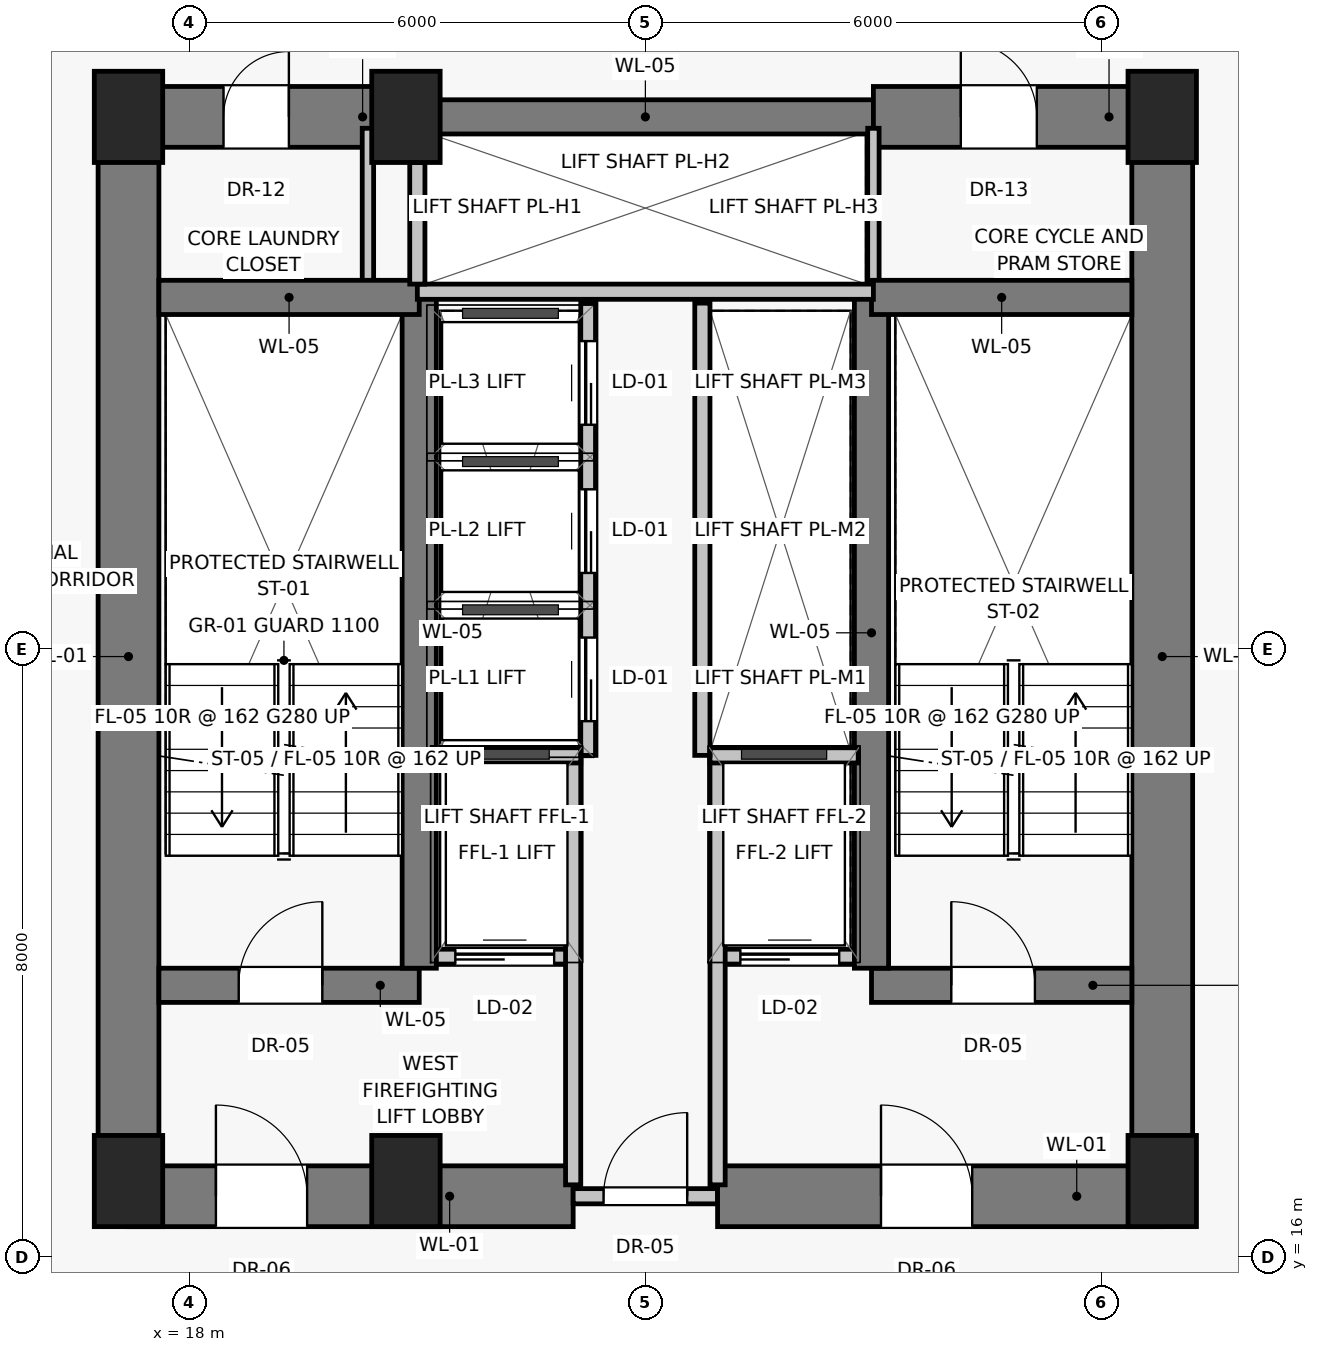
"""IFC4 building model, lengths in metres.
Left out: names, types, materials, properties, quantities, classifications, styles, units other than length and angle.
Written with IfcOpenShell. Run it as: python <this file> out.ifc"""

import sys

from ifc_helpers import new_model, si_unit, direction, frame, frame_2d, origin, origin_2d, place, context, subcontext, project, spatial, rectangle, extrude, source, transform, mapped, element, fill, save


model = new_model("IFC4")
c1 = context("Model", 3, precision=1e-05, world=origin(), true_north=direction((0.0, 1.0)))
c2 = subcontext(c1, "Body", "Model", "MODEL_VIEW")
j1 = project(units=[si_unit("LENGTHUNIT", "METRE"), si_unit("PLANEANGLEUNIT", "RADIAN")], contexts=[c1])
p1 = place(None, origin())
s1 = spatial("IfcSite", under=j1, at=p1, CompositionType="ELEMENT")
p2 = place(p1, origin())
s2 = spatial("IfcBuilding", under=s1, at=p2, CompositionType="ELEMENT")
p3 = place(p2, frame((0.0, 0.0, 43.55)))
s3 = spatial("IfcBuildingStorey", under=s2, at=p3, CompositionType="ELEMENT", Elevation=43.55)
for number, where, z_axis, x_axis in (
    (1, (17.2, 17.0, 0.0), (0.0, 0.0, 1.0), (1.0, 0.0, 0.0)),
    (2, (20.85, 17.0, 0.0), (0.0, 0.0, 1.0), (1.0, 0.0, 0.0)),
    (3, (30.8, 17.0, 0.0), (0.0, 0.0, 1.0), (1.0, 0.0, 0.0)),
    (4, (17.2, 31.0, 0.0), (0.0, 0.0, 1.0), (1.0, 0.0, 0.0)),
    (5, (20.85, 31.0, 0.0), (0.0, 0.0, 1.0), (1.0, 0.0, 0.0)),
    (6, (30.8, 31.0, 0.0), (0.0, 0.0, 1.0), (1.0, 0.0, 0.0)),
):
    element("IfcColumn", number, at=place(p3, frame(where, z_axis=z_axis, x_axis=x_axis)), inside=s3, PredefinedType="PILASTER", context=c2, shape_type="SweptSolid", body=[
        extrude(rectangle(XDim=0.9, YDim=1.2, at=origin_2d()), origin(), (0.0, 0.0, 1.0), 3.25),
    ])
for number, where, z_axis, x_axis in (
    (7, (17.2, 16.8, 0.0), (0.0, 0.0, 1.0), (0.0, 1.0, 0.0)),
    (8, (30.8, 16.8, 0.0), (0.0, 0.0, 1.0), (0.0, 1.0, 0.0)),
):
    element("IfcWall", number, at=place(p3, frame(where, z_axis=z_axis, x_axis=x_axis)), inside=s3, PredefinedType="SHEAR", context=c2, shape_type="SweptSolid", body=[
        extrude(rectangle(XDim=14.2, YDim=0.8, at=frame_2d((7.1, 0.0))), origin(), (0.0, 0.0, 1.0), 3.0),
    ])
p4 = place(p3, frame((17.2, 16.8, 0.0), z_axis=(0.0, 0.0, 1.0), x_axis=(1.0, 0.0, 0.0)))
e9 = element("IfcWall", 9, at=p4, inside=s3, PredefinedType="SHEAR", context=c2, shape_type="SweptSolid", body=[
    extrude(rectangle(XDim=5.85, YDim=0.8, at=frame_2d((2.925, 0.0))), origin(), (0.0, 0.0, 1.0), 3.0),
])
p5 = place(p4, frame((1.15, 0.0, 0.0)))
e10 = element("IfcOpeningElement", 10, at=p5, cuts=e9, PredefinedType="OPENING", context=c2, shape_type="SweptSolid", body=[
    extrude(rectangle(XDim=1.2, YDim=2.03, at=frame_2d((0.6, 1.015))), frame((0.0, 0.41, 0.0), z_axis=(0.0, -1.0, 0.0), x_axis=(1.0, 0.0, 0.0)), (0.0, 0.0, 1.0), 0.82),
])
p6 = place(p3, frame((23.05, 16.8, 0.0), z_axis=(0.0, 0.0, 1.0), x_axis=(1.0, 0.0, 0.0)))
e11 = element("IfcWall", 11, at=p6, inside=s3, PredefinedType="SOLIDWALL", context=c2, shape_type="SweptSolid", body=[
    extrude(rectangle(XDim=1.9, YDim=0.2, at=frame_2d((0.95, 0.0))), origin(), (0.0, 0.0, 1.0), 2.15),
])
p7 = place(p6, frame((0.4, 0.0, 0.0)))
e12 = element("IfcOpeningElement", 12, at=p7, cuts=e11, PredefinedType="OPENING", context=c2, shape_type="SweptSolid", body=[
    extrude(rectangle(XDim=1.1, YDim=2.03, at=frame_2d((0.55, 1.015))), frame((0.0, 0.11, 0.0), z_axis=(0.0, -1.0, 0.0), x_axis=(1.0, 0.0, 0.0)), (0.0, 0.0, 1.0), 0.22),
])
p8 = place(p3, frame((24.95, 16.8, 0.0), z_axis=(0.0, 0.0, 1.0), x_axis=(1.0, 0.0, 0.0)))
e13 = element("IfcWall", 13, at=p8, inside=s3, PredefinedType="SHEAR", context=c2, shape_type="SweptSolid", body=[
    extrude(rectangle(XDim=5.85, YDim=0.8, at=frame_2d((2.925, 0.0))), origin(), (0.0, 0.0, 1.0), 3.0),
])
p9 = place(p8, frame((2.15, 0.0, 0.0)))
e14 = element("IfcOpeningElement", 14, at=p9, cuts=e13, PredefinedType="OPENING", context=c2, shape_type="SweptSolid", body=[
    extrude(rectangle(XDim=1.2, YDim=2.03, at=frame_2d((0.6, 1.015))), frame((0.0, 0.41, 0.0), z_axis=(0.0, -1.0, 0.0), x_axis=(1.0, 0.0, 0.0)), (0.0, 0.0, 1.0), 0.82),
])
p10 = place(p3, frame((17.2, 31.0, 0.0), z_axis=(0.0, 0.0, 1.0), x_axis=(1.0, 0.0, 0.0)))
e15 = element("IfcWall", 15, at=p10, inside=s3, PredefinedType="SHEAR", context=c2, shape_type="SweptSolid", body=[
    extrude(rectangle(XDim=3.8, YDim=0.8, at=frame_2d((1.9, 0.0))), origin(), (0.0, 0.0, 1.0), 3.0),
])
p11 = place(p10, frame((1.25, 0.0, 0.0)))
e16 = element("IfcOpeningElement", 16, at=p11, cuts=e15, PredefinedType="OPENING", context=c2, shape_type="SweptSolid", body=[
    extrude(rectangle(XDim=0.86, YDim=2.01, at=frame_2d((0.43, 1.005))), frame((0.0, 0.41, 0.0), z_axis=(0.0, -1.0, 0.0), x_axis=(1.0, 0.0, 0.0)), (0.0, 0.0, 1.0), 0.82),
])
p12 = place(p3, frame((21.0, 31.0, 0.0), z_axis=(0.0, 0.0, 1.0), x_axis=(1.0, 0.0, 0.0)))
e17 = element("IfcWall", 17, at=p12, inside=s3, PredefinedType="SHEAR", context=c2, shape_type="SweptSolid", body=[
    extrude(rectangle(XDim=6.0, YDim=0.45, at=frame_2d((3.0, 0.0))), origin(), (0.0, 0.0, 1.0), 3.0),
])
p13 = place(p3, frame((27.0, 31.0, 0.0), z_axis=(0.0, 0.0, 1.0), x_axis=(1.0, 0.0, 0.0)))
e18 = element("IfcWall", 18, at=p13, inside=s3, PredefinedType="SHEAR", context=c2, shape_type="SweptSolid", body=[
    extrude(rectangle(XDim=3.8, YDim=0.8, at=frame_2d((1.9, 0.0))), origin(), (0.0, 0.0, 1.0), 3.0),
])
p14 = place(p13, frame((1.15, 0.0, 0.0)))
e19 = element("IfcOpeningElement", 19, at=p14, cuts=e18, PredefinedType="OPENING", context=c2, shape_type="SweptSolid", body=[
    extrude(rectangle(XDim=1.0, YDim=2.01, at=frame_2d((0.5, 1.005))), frame((0.0, 0.41, 0.0), z_axis=(0.0, -1.0, 0.0), x_axis=(1.0, 0.0, 0.0)), (0.0, 0.0, 1.0), 0.82),
])
for number, where, z_axis, x_axis in (
    (20, (20.35, 28.65, 0.0), (0.0, 0.0, 1.0), (0.0, 1.0, 0.0)),
    (21, (27.0, 28.65, 0.0), (0.0, 0.0, 1.0), (0.0, 1.0, 0.0)),
):
    element("IfcWall", number, at=place(p3, frame(where, z_axis=z_axis, x_axis=x_axis)), inside=s3, PredefinedType="PARTITIONING", context=c2, shape_type="SweptSolid", body=[
        extrude(rectangle(XDim=2.2, YDim=0.15, at=frame_2d((1.1, 0.0))), origin(), (0.0, 0.0, 1.0), 3.0),
    ])
p15 = place(p3, frame((17.6, 19.575, 0.0), z_axis=(0.0, 0.0, 1.0), x_axis=(1.0, 0.0, 0.0)))
e22 = element("IfcWall", 22, at=p15, inside=s3, PredefinedType="SHEAR", context=c2, shape_type="SweptSolid", body=[
    extrude(rectangle(XDim=3.425, YDim=0.45, at=frame_2d((1.712, 0.0))), origin(), (0.0, 0.0, 1.0), 3.0),
])
p16 = place(p15, frame((1.05, 0.0, 0.0)))
e23 = element("IfcOpeningElement", 23, at=p16, cuts=e22, PredefinedType="OPENING", context=c2, shape_type="SweptSolid", body=[
    extrude(rectangle(XDim=1.1, YDim=2.03, at=frame_2d((0.55, 1.015))), frame((0.0, 0.235, 0.0), z_axis=(0.0, -1.0, 0.0), x_axis=(1.0, 0.0, 0.0)), (0.0, 0.0, 1.0), 0.47),
])
p17 = place(p3, frame((21.2, 19.95, 0.0), z_axis=(0.0, 0.0, 1.0), x_axis=(1.0, 0.0, 0.0)))
e24 = element("IfcWall", 24, at=p17, inside=s3, PredefinedType="SOLIDWALL", context=c2, shape_type="SweptSolid", body=[
    extrude(rectangle(XDim=1.85, YDim=0.2, at=frame_2d((0.925, 0.0))), origin(), (0.0, 0.0, 1.0), 3.0),
])
p18 = place(p17, frame((0.3, 0.0, 0.0)))
e25 = element("IfcOpeningElement", 25, at=p18, cuts=e24, PredefinedType="OPENING", context=c2, shape_type="SweptSolid", body=[
    extrude(rectangle(XDim=1.3, YDim=2.25, at=frame_2d((0.65, 1.125))), frame((0.0, 0.11, 0.0), z_axis=(0.0, -1.0, 0.0), x_axis=(1.0, 0.0, 0.0)), (0.0, 0.0, 1.0), 0.22),
])
p19 = place(p3, frame((24.95, 19.95, 0.0), z_axis=(0.0, 0.0, 1.0), x_axis=(1.0, 0.0, 0.0)))
e26 = element("IfcWall", 26, at=p19, inside=s3, PredefinedType="SOLIDWALL", context=c2, shape_type="SweptSolid", body=[
    extrude(rectangle(XDim=1.85, YDim=0.2, at=frame_2d((0.925, 0.0))), origin(), (0.0, 0.0, 1.0), 3.0),
])
p20 = place(p19, frame((0.3, 0.0, 0.0)))
e27 = element("IfcOpeningElement", 27, at=p20, cuts=e26, PredefinedType="OPENING", context=c2, shape_type="SweptSolid", body=[
    extrude(rectangle(XDim=1.3, YDim=2.25, at=frame_2d((0.65, 1.125))), frame((0.0, 0.11, 0.0), z_axis=(0.0, -1.0, 0.0), x_axis=(1.0, 0.0, 0.0)), (0.0, 0.0, 1.0), 0.22),
])
p21 = place(p3, frame((26.975, 19.575, 0.0), z_axis=(0.0, 0.0, 1.0), x_axis=(1.0, 0.0, 0.0)))
e28 = element("IfcWall", 28, at=p21, inside=s3, PredefinedType="SHEAR", context=c2, shape_type="SweptSolid", body=[
    extrude(rectangle(XDim=3.425, YDim=0.45, at=frame_2d((1.712, 0.0))), origin(), (0.0, 0.0, 1.0), 3.0),
])
p22 = place(p21, frame((1.05, 0.0, 0.0)))
e29 = element("IfcOpeningElement", 29, at=p22, cuts=e28, PredefinedType="OPENING", context=c2, shape_type="SweptSolid", body=[
    extrude(rectangle(XDim=1.1, YDim=2.03, at=frame_2d((0.55, 1.015))), frame((0.0, 0.235, 0.0), z_axis=(0.0, -1.0, 0.0), x_axis=(1.0, 0.0, 0.0)), (0.0, 0.0, 1.0), 0.47),
])
for number, where, z_axis, x_axis in (
    (30, (21.025, 19.8, 0.0), (0.0, 0.0, 1.0), (0.0, 1.0, 0.0)),
    (31, (26.975, 19.8, 0.0), (0.0, 0.0, 1.0), (0.0, 1.0, 0.0)),
):
    element("IfcWall", number, at=place(p3, frame(where, z_axis=z_axis, x_axis=x_axis)), inside=s3, PredefinedType="SHEAR", context=c2, shape_type="SweptSolid", body=[
        extrude(rectangle(XDim=8.825, YDim=0.45, at=frame_2d((4.413, 0.0))), origin(), (0.0, 0.0, 1.0), 3.0),
    ])
for number, where, z_axis, x_axis in (
    (32, (17.6, 28.625, 0.0), (0.0, 0.0, 1.0), (1.0, 0.0, 0.0)),
    (33, (26.975, 28.625, 0.0), (0.0, 0.0, 1.0), (1.0, 0.0, 0.0)),
):
    element("IfcWall", number, at=place(p3, frame(where, z_axis=z_axis, x_axis=x_axis)), inside=s3, PredefinedType="SHEAR", context=c2, shape_type="SweptSolid", body=[
        extrude(rectangle(XDim=3.425, YDim=0.45, at=frame_2d((1.712, 0.0))), origin(), (0.0, 0.0, 1.0), 3.0),
    ])
for number, where, z_axis, x_axis in (
    (34, (23.05, 16.95, 0.0), (0.0, 0.0, 1.0), (0.0, 1.0, 0.0)),
    (35, (24.95, 16.95, 0.0), (0.0, 0.0, 1.0), (0.0, 1.0, 0.0)),
):
    element("IfcWall", number, at=place(p3, frame(where, z_axis=z_axis, x_axis=x_axis)), inside=s3, PredefinedType="SOLIDWALL", context=c2, shape_type="SweptSolid", body=[
        extrude(rectangle(XDim=5.6, YDim=0.2, at=frame_2d((2.8, 0.0))), origin(), (0.0, 0.0, 1.0), 3.0),
    ])
for number, where, z_axis, x_axis in (
    (36, (21.2, 22.6, 0.0), (0.0, 0.0, 1.0), (1.0, 0.0, 0.0)),
    (37, (24.85, 22.6, 0.0), (0.0, 0.0, 1.0), (1.0, 0.0, 0.0)),
):
    element("IfcWall", number, at=place(p3, frame(where, z_axis=z_axis, x_axis=x_axis)), inside=s3, PredefinedType="SOLIDWALL", context=c2, shape_type="SweptSolid", body=[
        extrude(rectangle(XDim=1.95, YDim=0.2, at=frame_2d((0.975, 0.0))), origin(), (0.0, 0.0, 1.0), 3.0),
    ])
p23 = place(p3, frame((21.0, 28.7, 0.0), z_axis=(0.0, 0.0, 1.0), x_axis=(1.0, 0.0, 0.0)))
e38 = element("IfcWall", 38, at=p23, inside=s3, PredefinedType="SOLIDWALL", context=c2, shape_type="SweptSolid", body=[
    extrude(rectangle(XDim=6.0, YDim=0.2, at=frame_2d((3.0, 0.0))), origin(), (0.0, 0.0, 1.0), 3.0),
])
p24 = place(p3, frame((21.0, 28.8, 0.0), z_axis=(0.0, 0.0, 1.0), x_axis=(0.0, 1.0, 0.0)))
e39 = element("IfcWall", 39, at=p24, inside=s3, PredefinedType="SOLIDWALL", context=c2, shape_type="SweptSolid", body=[
    extrude(rectangle(XDim=1.6, YDim=0.2, at=frame_2d((0.8, 0.0))), origin(), (0.0, 0.0, 1.0), 3.0),
])
p25 = place(p3, frame((23.25, 22.6, 0.0), z_axis=(0.0, 0.0, 1.0), x_axis=(0.0, 1.0, 0.0)))
e40 = element("IfcWall", 40, at=p25, inside=s3, PredefinedType="SOLIDWALL", context=c2, shape_type="SweptSolid", body=[
    extrude(rectangle(XDim=5.95, YDim=0.2, at=frame_2d((2.975, 0.0))), origin(), (0.0, 0.0, 1.0), 3.0),
])
p26 = place(p25, frame((0.45, 0.0, 0.0)))
e41 = element("IfcOpeningElement", 41, at=p26, cuts=e40, PredefinedType="OPENING", context=c2, shape_type="SweptSolid", body=[
    extrude(rectangle(XDim=1.1, YDim=2.08, at=frame_2d((0.55, 1.04))), frame((0.0, 0.11, 0.0), z_axis=(0.0, -1.0, 0.0), x_axis=(1.0, 0.0, 0.0)), (0.0, 0.0, 1.0), 0.22),
])
p27 = place(p25, frame((2.4, 0.0, 0.0)))
e42 = element("IfcOpeningElement", 42, at=p27, cuts=e40, PredefinedType="OPENING", context=c2, shape_type="SweptSolid", body=[
    extrude(rectangle(XDim=1.1, YDim=2.08, at=frame_2d((0.55, 1.04))), frame((0.0, 0.11, 0.0), z_axis=(0.0, -1.0, 0.0), x_axis=(1.0, 0.0, 0.0)), (0.0, 0.0, 1.0), 0.22),
])
p28 = place(p25, frame((4.35, 0.0, 0.0)))
e43 = element("IfcOpeningElement", 43, at=p28, cuts=e40, PredefinedType="OPENING", context=c2, shape_type="SweptSolid", body=[
    extrude(rectangle(XDim=1.1, YDim=2.08, at=frame_2d((0.55, 1.04))), frame((0.0, 0.11, 0.0), z_axis=(0.0, -1.0, 0.0), x_axis=(1.0, 0.0, 0.0)), (0.0, 0.0, 1.0), 0.22),
])
p29 = place(p3, frame((24.75, 22.6, 0.0), z_axis=(0.0, 0.0, 1.0), x_axis=(0.0, 1.0, 0.0)))
e44 = element("IfcWall", 44, at=p29, inside=s3, PredefinedType="SOLIDWALL", context=c2, shape_type="SweptSolid", body=[
    extrude(rectangle(XDim=5.95, YDim=0.2, at=frame_2d((2.975, 0.0))), origin(), (0.0, 0.0, 1.0), 3.0),
])
m1 = source(origin(), c2, "Body", "SweptSolid", [
    extrude(rectangle(XDim=1.2, YDim=2.03, at=frame_2d((0.6, 1.015))), frame((0.0, 0.025, 0.0), z_axis=(0.0, -1.0, 0.0), x_axis=(1.0, 0.0, 0.0)), (0.0, 0.0, 1.0), 0.05),
])
p30 = place(p5, origin())
e45 = element("IfcDoor", 45, at=p30, inside=s3, OperationType="SINGLE_SWING_LEFT", PredefinedType="DOOR", context=c2, shape_type="MappedRepresentation", body=[
    mapped(m1, transform((0.0, 0.0, 0.0), scale=1.0)),
])
fill(e10, e45)
m2 = source(origin(), c2, "Body", "SweptSolid", [
    extrude(rectangle(XDim=1.1, YDim=2.03, at=frame_2d((0.55, 1.015))), frame((0.0, 0.025, 0.0), z_axis=(0.0, -1.0, 0.0), x_axis=(1.0, 0.0, 0.0)), (0.0, 0.0, 1.0), 0.05),
])
p31 = place(p7, origin())
e46 = element("IfcDoor", 46, at=p31, inside=s3, OperationType="SINGLE_SWING_RIGHT", PredefinedType="DOOR", context=c2, shape_type="MappedRepresentation", body=[
    mapped(m2, transform((0.0, 0.0, 0.0), scale=1.0)),
])
fill(e12, e46)
p32 = place(p9, origin())
e47 = element("IfcDoor", 47, at=p32, inside=s3, OperationType="SINGLE_SWING_LEFT", PredefinedType="DOOR", context=c2, shape_type="MappedRepresentation", body=[
    mapped(m1, transform((0.0, 0.0, 0.0), scale=1.0)),
])
fill(e14, e47)
m3 = source(origin(), c2, "Body", "SweptSolid", [
    extrude(rectangle(XDim=0.86, YDim=2.01, at=frame_2d((0.43, 1.005))), frame((0.0, 0.025, 0.0), z_axis=(0.0, -1.0, 0.0), x_axis=(1.0, 0.0, 0.0)), (0.0, 0.0, 1.0), 0.05),
])
p33 = place(p11, origin())
e48 = element("IfcDoor", 48, at=p33, inside=s3, OperationType="SINGLE_SWING_RIGHT", PredefinedType="DOOR", context=c2, shape_type="MappedRepresentation", body=[
    mapped(m3, transform((0.0, 0.0, 0.0), scale=1.0)),
])
fill(e16, e48)
m4 = source(origin(), c2, "Body", "SweptSolid", [
    extrude(rectangle(XDim=1.0, YDim=2.01, at=frame_2d((0.5, 1.005))), frame((0.0, 0.025, 0.0), z_axis=(0.0, -1.0, 0.0), x_axis=(1.0, 0.0, 0.0)), (0.0, 0.0, 1.0), 0.05),
])
p34 = place(p14, origin())
e49 = element("IfcDoor", 49, at=p34, inside=s3, OperationType="SINGLE_SWING_LEFT", PredefinedType="DOOR", context=c2, shape_type="MappedRepresentation", body=[
    mapped(m4, transform((0.0, 0.0, 0.0), scale=1.0)),
])
fill(e19, e49)
p35 = place(p16, origin())
e50 = element("IfcDoor", 50, at=p35, inside=s3, OperationType="SINGLE_SWING_RIGHT", PredefinedType="DOOR", context=c2, shape_type="MappedRepresentation", body=[
    mapped(m2, transform((0.0, 0.0, 0.0), scale=1.0)),
])
fill(e23, e50)
m5 = source(origin(), c2, "Body", "SweptSolid", [
    extrude(rectangle(XDim=1.3, YDim=2.25, at=frame_2d((0.65, 1.125))), frame((0.0, 0.025, 0.0), z_axis=(0.0, -1.0, 0.0), x_axis=(1.0, 0.0, 0.0)), (0.0, 0.0, 1.0), 0.05),
])
p36 = place(p18, origin())
e51 = element("IfcDoor", 51, at=p36, inside=s3, OperationType="SLIDING_TO_LEFT", PredefinedType="DOOR", context=c2, shape_type="MappedRepresentation", body=[
    mapped(m5, transform((0.0, 0.0, 0.0), scale=1.0)),
])
fill(e25, e51)
p37 = place(p20, origin())
e52 = element("IfcDoor", 52, at=p37, inside=s3, OperationType="SLIDING_TO_LEFT", PredefinedType="DOOR", context=c2, shape_type="MappedRepresentation", body=[
    mapped(m5, transform((0.0, 0.0, 0.0), scale=1.0)),
])
fill(e27, e52)
p38 = place(p22, origin())
e53 = element("IfcDoor", 53, at=p38, inside=s3, OperationType="SINGLE_SWING_LEFT", PredefinedType="DOOR", context=c2, shape_type="MappedRepresentation", body=[
    mapped(m2, transform((0.0, 0.0, 0.0), scale=1.0)),
])
fill(e29, e53)
m6 = source(origin(), c2, "Body", "SweptSolid", [
    extrude(rectangle(XDim=1.1, YDim=2.08, at=frame_2d((0.55, 1.04))), frame((0.0, 0.025, 0.0), z_axis=(0.0, -1.0, 0.0), x_axis=(1.0, 0.0, 0.0)), (0.0, 0.0, 1.0), 0.05),
])
p39 = place(p26, origin())
e54 = element("IfcDoor", 54, at=p39, inside=s3, OperationType="SLIDING_TO_LEFT", PredefinedType="DOOR", context=c2, shape_type="MappedRepresentation", body=[
    mapped(m6, transform((0.0, 0.0, 0.0), scale=1.0)),
])
fill(e41, e54)
p40 = place(p27, origin())
e55 = element("IfcDoor", 55, at=p40, inside=s3, OperationType="SLIDING_TO_LEFT", PredefinedType="DOOR", context=c2, shape_type="MappedRepresentation", body=[
    mapped(m6, transform((0.0, 0.0, 0.0), scale=1.0)),
])
fill(e42, e55)
p41 = place(p28, origin())
e56 = element("IfcDoor", 56, at=p41, inside=s3, OperationType="SLIDING_TO_LEFT", PredefinedType="DOOR", context=c2, shape_type="MappedRepresentation", body=[
    mapped(m6, transform((0.0, 0.0, 0.0), scale=1.0)),
])
fill(e43, e56)
save(model, sys.argv[1])
